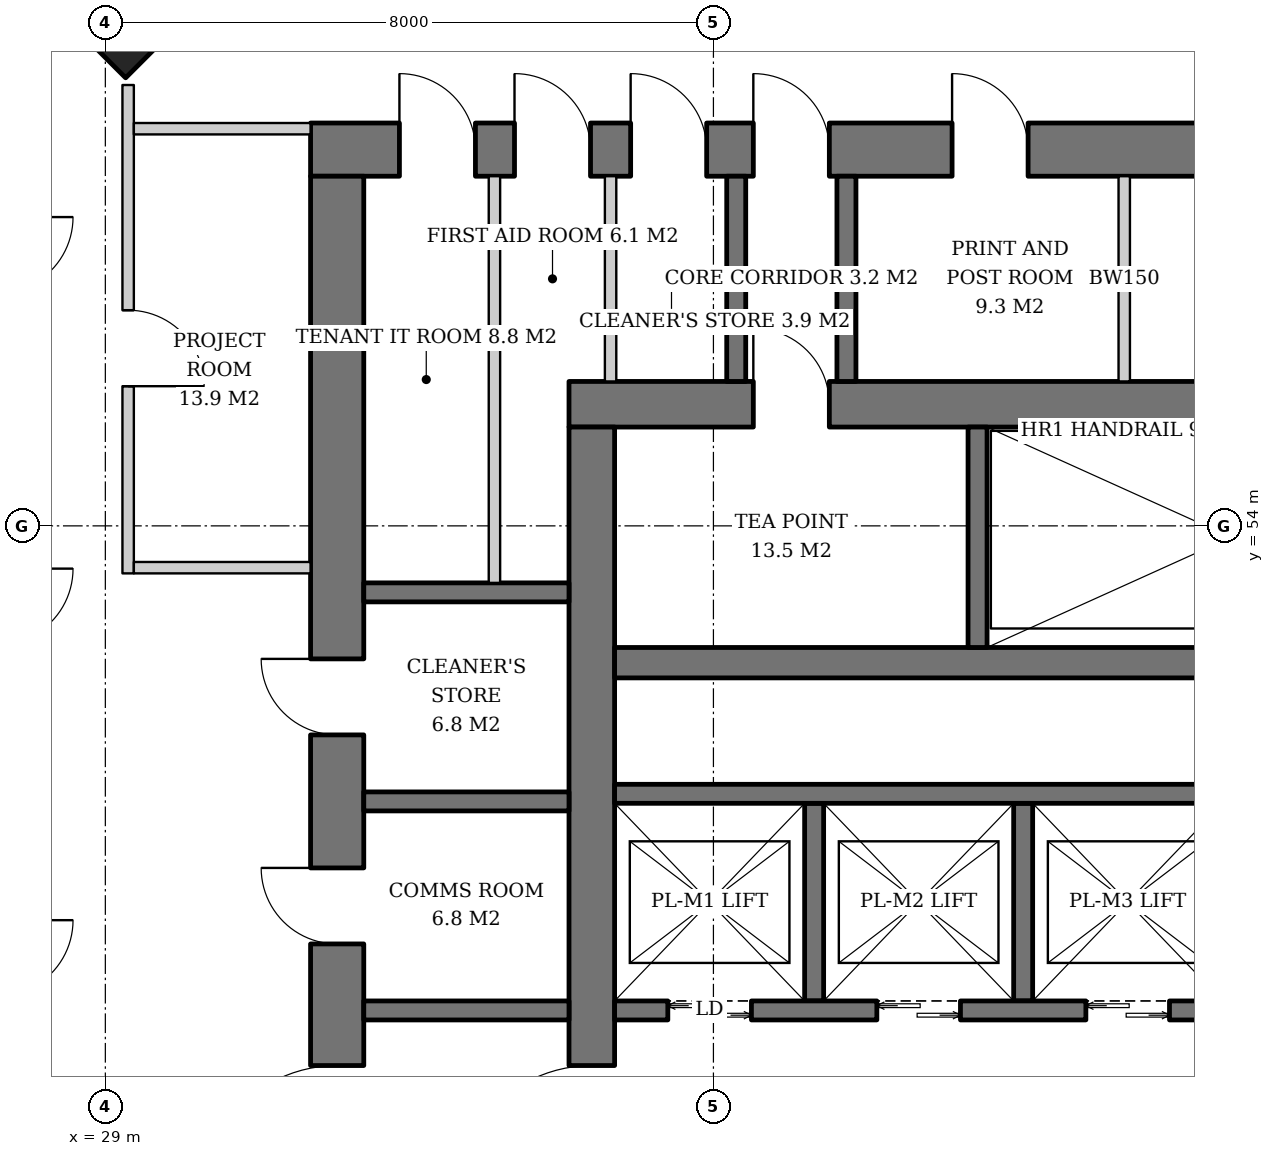
"""IFC4 building model, lengths in metres.
Left out: names, types, materials, properties, quantities, classifications, styles, units other than length and angle.
Written with IfcOpenShell. Run it as: python <this file> out.ifc"""

import sys

from ifc_helpers import new_model, si_unit, direction, frame, frame_2d, origin, origin_2d, place, context, subcontext, project, spatial, rectangle, extrude, element, fill, save


model = new_model("IFC4")
c1 = context("Model", 3, precision=1e-05, world=origin(), true_north=direction((0.0, 1.0)))
c2 = subcontext(c1, "Body", "Model", "MODEL_VIEW")
j1 = project(units=[si_unit("LENGTHUNIT", "METRE"), si_unit("PLANEANGLEUNIT", "RADIAN")], contexts=[c1])
p1 = place(None, origin())
s1 = spatial("IfcSite", under=j1, at=p1, CompositionType="ELEMENT")
p2 = place(p1, origin())
s2 = spatial("IfcBuilding", under=s1, at=p2, CompositionType="ELEMENT")
p3 = place(p2, frame((0.0, 0.0, 150.2)))
s3 = spatial("IfcBuildingStorey", under=s2, at=p3, CompositionType="ELEMENT", Elevation=150.2)
p4 = place(p3, frame((29.229, 61.771, 0.0), z_axis=(0.031962158256, -0.031962158256, 0.998977898093), x_axis=(0.707106781187, 0.707106781187, 0.0)))
e1 = element("IfcColumn", 1, at=p4, inside=s3, PredefinedType="COLUMN", context=c2, shape_type="SweptSolid", body=[
    extrude(rectangle(XDim=2.6, YDim=2.6, at=origin_2d()), origin(), (0.0, 0.0, 1.0), 3.804),
])
p5 = place(p3, frame((35.1, 55.6, 0.0), z_axis=(0.0, 0.0, 1.0), x_axis=(1.0, 0.0, 0.0)))
e2 = element("IfcWall", 2, at=p5, inside=s3, PredefinedType="SHEAR", context=c2, shape_type="SweptSolid", body=[
    extrude(rectangle(XDim=19.8, YDim=0.6, at=frame_2d((9.9, 0.0))), origin(), (0.0, 0.0, 1.0), 3.8),
])
p6 = place(p5, frame((14.54, 0.0, 0.0)))
e3 = element("IfcOpeningElement", 3, at=p6, cuts=e2, PredefinedType="OPENING", context=c2, shape_type="SweptSolid", body=[
    extrude(rectangle(XDim=1.0, YDim=2.1, at=frame_2d((0.5, 1.05))), frame((0.0, 0.31, 0.0), z_axis=(0.0, -1.0, 0.0), x_axis=(1.0, 0.0, 0.0)), (0.0, 0.0, 1.0), 0.62),
])
p7 = place(p5, frame((2.425, 0.0, 0.0)))
e4 = element("IfcOpeningElement", 4, at=p7, cuts=e2, PredefinedType="OPENING", context=c2, shape_type="SweptSolid", body=[
    extrude(rectangle(XDim=1.0, YDim=2.1, at=frame_2d((0.5, 1.05))), frame((0.0, 0.31, 0.0), z_axis=(0.0, -1.0, 0.0), x_axis=(1.0, 0.0, 0.0)), (0.0, 0.0, 1.0), 0.62),
])
p8 = place(p3, frame((35.4, 36.7, 0.0), z_axis=(0.0, 0.0, 1.0), x_axis=(0.0, 1.0, 0.0)))
e5 = element("IfcWall", 5, at=p8, inside=s3, PredefinedType="SHEAR", context=c2, shape_type="SweptSolid", body=[
    extrude(rectangle(XDim=18.6, YDim=0.6, at=frame_2d((9.3, 0.0))), origin(), (0.0, 0.0, 1.0), 3.8),
])
p9 = place(p8, frame((8.4, 0.0, 0.0)))
e6 = element("IfcOpeningElement", 6, at=p9, cuts=e5, PredefinedType="OPENING", context=c2, shape_type="SweptSolid", body=[
    extrude(rectangle(XDim=1.8, YDim=2.4, at=frame_2d((0.9, 1.2))), frame((0.0, 0.31, 0.0), z_axis=(0.0, -1.0, 0.0), x_axis=(1.0, 0.0, 0.0)), (0.0, 0.0, 1.0), 0.62),
])
p10 = place(p3, frame((31.7, 58.95, 0.0), z_axis=(0.0, 0.0, 1.0), x_axis=(1.0, 0.0, 0.0)))
e7 = element("IfcWall", 7, at=p10, inside=s3, PredefinedType="SHEAR", context=c2, shape_type="SweptSolid", body=[
    extrude(rectangle(XDim=26.6, YDim=0.7, at=frame_2d((13.3, 0.0))), origin(), (0.0, 0.0, 1.0), 3.8),
])
p11 = place(p10, frame((17.94, 0.0, 0.0)))
e8 = element("IfcOpeningElement", 8, at=p11, cuts=e7, PredefinedType="OPENING", context=c2, shape_type="SweptSolid", body=[
    extrude(rectangle(XDim=1.0, YDim=2.1, at=frame_2d((0.5, 1.05))), frame((0.0, 0.36, 0.0), z_axis=(0.0, -1.0, 0.0), x_axis=(1.0, 0.0, 0.0)), (0.0, 0.0, 1.0), 0.72),
])
p12 = place(p10, frame((5.825, 0.0, 0.0)))
e9 = element("IfcOpeningElement", 9, at=p12, cuts=e7, PredefinedType="OPENING", context=c2, shape_type="SweptSolid", body=[
    extrude(rectangle(XDim=1.0, YDim=2.1, at=frame_2d((0.5, 1.05))), frame((0.0, 0.36, 0.0), z_axis=(0.0, -1.0, 0.0), x_axis=(1.0, 0.0, 0.0)), (0.0, 0.0, 1.0), 0.72),
])
p13 = place(p10, frame((1.169, 0.0, 0.0)))
e10 = element("IfcOpeningElement", 10, at=p13, cuts=e7, PredefinedType="OPENING", context=c2, shape_type="SweptSolid", body=[
    extrude(rectangle(XDim=1.0, YDim=2.1, at=frame_2d((0.5, 1.05))), frame((0.0, 0.36, 0.0), z_axis=(0.0, -1.0, 0.0), x_axis=(1.0, 0.0, 0.0)), (0.0, 0.0, 1.0), 0.72),
])
p14 = place(p10, frame((2.683, 0.0, 0.0)))
e11 = element("IfcOpeningElement", 11, at=p14, cuts=e7, PredefinedType="OPENING", context=c2, shape_type="SweptSolid", body=[
    extrude(rectangle(XDim=1.0, YDim=2.1, at=frame_2d((0.5, 1.05))), frame((0.0, 0.36, 0.0), z_axis=(0.0, -1.0, 0.0), x_axis=(1.0, 0.0, 0.0)), (0.0, 0.0, 1.0), 0.72),
])
p15 = place(p10, frame((4.211, 0.0, 0.0)))
e12 = element("IfcOpeningElement", 12, at=p15, cuts=e7, PredefinedType="OPENING", context=c2, shape_type="SweptSolid", body=[
    extrude(rectangle(XDim=1.0, YDim=2.1, at=frame_2d((0.5, 1.05))), frame((0.0, 0.36, 0.0), z_axis=(0.0, -1.0, 0.0), x_axis=(1.0, 0.0, 0.0)), (0.0, 0.0, 1.0), 0.72),
])
p16 = place(p10, frame((8.44, 0.0, 0.0)))
e13 = element("IfcOpeningElement", 13, at=p16, cuts=e7, PredefinedType="OPENING", context=c2, shape_type="SweptSolid", body=[
    extrude(rectangle(XDim=1.0, YDim=2.1, at=frame_2d((0.5, 1.05))), frame((0.0, 0.36, 0.0), z_axis=(0.0, -1.0, 0.0), x_axis=(1.0, 0.0, 0.0)), (0.0, 0.0, 1.0), 0.72),
])
p17 = place(p10, frame((13.342, 0.0, 0.0)))
e14 = element("IfcOpeningElement", 14, at=p17, cuts=e7, PredefinedType="OPENING", context=c2, shape_type="SweptSolid", body=[
    extrude(rectangle(XDim=1.0, YDim=2.1, at=frame_2d((0.5, 1.05))), frame((0.0, 0.36, 0.0), z_axis=(0.0, -1.0, 0.0), x_axis=(1.0, 0.0, 0.0)), (0.0, 0.0, 1.0), 0.72),
])
p18 = place(p10, frame((22.4, 0.0, 0.0)))
e15 = element("IfcOpeningElement", 15, at=p18, cuts=e7, PredefinedType="OPENING", context=c2, shape_type="SweptSolid", body=[
    extrude(rectangle(XDim=1.0, YDim=2.1, at=frame_2d((0.5, 1.05))), frame((0.0, 0.36, 0.0), z_axis=(0.0, -1.0, 0.0), x_axis=(1.0, 0.0, 0.0)), (0.0, 0.0, 1.0), 0.72),
])
p19 = place(p3, frame((32.05, 33.4, 0.0), z_axis=(0.0, 0.0, 1.0), x_axis=(0.0, 1.0, 0.0)))
e16 = element("IfcWall", 16, at=p19, inside=s3, PredefinedType="SHEAR", context=c2, shape_type="SweptSolid", body=[
    extrude(rectangle(XDim=25.2, YDim=0.7, at=frame_2d((12.6, 0.0))), origin(), (0.0, 0.0, 1.0), 3.8),
])
p20 = place(p19, frame((11.7, 0.0, 0.0)))
e17 = element("IfcOpeningElement", 17, at=p20, cuts=e16, PredefinedType="OPENING", context=c2, shape_type="SweptSolid", body=[
    extrude(rectangle(XDim=1.8, YDim=2.4, at=frame_2d((0.9, 1.2))), frame((0.0, 0.36, 0.0), z_axis=(0.0, -1.0, 0.0), x_axis=(1.0, 0.0, 0.0)), (0.0, 0.0, 1.0), 0.72),
])
p21 = place(p19, frame((3.6, 0.0, 0.0)))
e18 = element("IfcOpeningElement", 18, at=p21, cuts=e16, PredefinedType="OPENING", context=c2, shape_type="SweptSolid", body=[
    extrude(rectangle(XDim=1.0, YDim=2.1, at=frame_2d((0.5, 1.05))), frame((0.0, 0.36, 0.0), z_axis=(0.0, -1.0, 0.0), x_axis=(1.0, 0.0, 0.0)), (0.0, 0.0, 1.0), 0.72),
])
p22 = place(p19, frame((6.35, 0.0, 0.0)))
e19 = element("IfcOpeningElement", 19, at=p22, cuts=e16, PredefinedType="OPENING", context=c2, shape_type="SweptSolid", body=[
    extrude(rectangle(XDim=1.0, YDim=2.1, at=frame_2d((0.5, 1.05))), frame((0.0, 0.36, 0.0), z_axis=(0.0, -1.0, 0.0), x_axis=(1.0, 0.0, 0.0)), (0.0, 0.0, 1.0), 0.72),
])
p23 = place(p19, frame((9.1, 0.0, 0.0)))
e20 = element("IfcOpeningElement", 20, at=p23, cuts=e16, PredefinedType="OPENING", context=c2, shape_type="SweptSolid", body=[
    extrude(rectangle(XDim=1.0, YDim=2.1, at=frame_2d((0.5, 1.05))), frame((0.0, 0.36, 0.0), z_axis=(0.0, -1.0, 0.0), x_axis=(1.0, 0.0, 0.0)), (0.0, 0.0, 1.0), 0.72),
])
p24 = place(p19, frame((15.1, 0.0, 0.0)))
e21 = element("IfcOpeningElement", 21, at=p24, cuts=e16, PredefinedType="OPENING", context=c2, shape_type="SweptSolid", body=[
    extrude(rectangle(XDim=1.0, YDim=2.1, at=frame_2d((0.5, 1.05))), frame((0.0, 0.36, 0.0), z_axis=(0.0, -1.0, 0.0), x_axis=(1.0, 0.0, 0.0)), (0.0, 0.0, 1.0), 0.72),
])
p25 = place(p19, frame((17.85, 0.0, 0.0)))
e22 = element("IfcOpeningElement", 22, at=p25, cuts=e16, PredefinedType="OPENING", context=c2, shape_type="SweptSolid", body=[
    extrude(rectangle(XDim=1.0, YDim=2.1, at=frame_2d((0.5, 1.05))), frame((0.0, 0.36, 0.0), z_axis=(0.0, -1.0, 0.0), x_axis=(1.0, 0.0, 0.0)), (0.0, 0.0, 1.0), 0.72),
])
p26 = place(p3, frame((35.7, 52.2, 0.0), z_axis=(0.0, 0.0, 1.0), x_axis=(1.0, 0.0, 0.0)))
e23 = element("IfcWall", 23, at=p26, inside=s3, PredefinedType="SHEAR", context=c2, shape_type="SweptSolid", body=[
    extrude(rectangle(XDim=18.6, YDim=0.4, at=frame_2d((9.3, 0.0))), origin(), (0.0, 0.0, 1.0), 3.8),
])
p27 = place(p3, frame((40.475, 52.4, 0.0), z_axis=(0.0, 0.0, 1.0), x_axis=(0.0, 1.0, 0.0)))
e24 = element("IfcWall", 24, at=p27, inside=s3, PredefinedType="SHEAR", context=c2, shape_type="SweptSolid", body=[
    extrude(rectangle(XDim=2.9, YDim=0.25, at=frame_2d((1.45, 0.0))), origin(), (0.0, 0.0, 1.0), 3.8),
])
for number, where, z_axis, x_axis in (
    (25, (38.325, 47.75, 0.0), (0.0, 0.0, 1.0), (0.0, 1.0, 0.0)),
    (26, (41.075, 47.75, 0.0), (0.0, 0.0, 1.0), (0.0, 1.0, 0.0)),
):
    element("IfcWall", number, at=place(p3, frame(where, z_axis=z_axis, x_axis=x_axis)), inside=s3, PredefinedType="SHEAR", context=c2, shape_type="SweptSolid", body=[
        extrude(rectangle(XDim=2.6, YDim=0.25, at=frame_2d((1.3, 0.0))), origin(), (0.0, 0.0, 1.0), 3.8),
    ])
p28 = place(p3, frame((35.7, 50.475, 0.0), z_axis=(0.0, 0.0, 1.0), x_axis=(1.0, 0.0, 0.0)))
e27 = element("IfcWall", 27, at=p28, inside=s3, PredefinedType="SHEAR", context=c2, shape_type="SweptSolid", body=[
    extrude(rectangle(XDim=11.0, YDim=0.25, at=frame_2d((5.5, 0.0))), origin(), (0.0, 0.0, 1.0), 3.8),
])
p29 = place(p3, frame((35.7, 47.625, 0.0), z_axis=(0.0, 0.0, 1.0), x_axis=(1.0, 0.0, 0.0)))
e28 = element("IfcWall", 28, at=p29, inside=s3, PredefinedType="SHEAR", context=c2, shape_type="SweptSolid", body=[
    extrude(rectangle(XDim=12.83, YDim=0.25, at=frame_2d((6.415, 0.0))), origin(), (0.0, 0.0, 1.0), 3.8),
])
p30 = place(p29, frame((0.7, 0.0, 0.0)))
e29 = element("IfcOpeningElement", 29, at=p30, cuts=e28, PredefinedType="OPENING", context=c2, shape_type="SweptSolid", body=[
    extrude(rectangle(XDim=1.1, YDim=2.2, at=frame_2d((0.55, 1.1))), frame((0.0, 0.135, 0.0), z_axis=(0.0, -1.0, 0.0), x_axis=(1.0, 0.0, 0.0)), (0.0, 0.0, 1.0), 0.27),
])
p31 = place(p29, frame((3.45, 0.0, 0.0)))
e30 = element("IfcOpeningElement", 30, at=p31, cuts=e28, PredefinedType="OPENING", context=c2, shape_type="SweptSolid", body=[
    extrude(rectangle(XDim=1.1, YDim=2.2, at=frame_2d((0.55, 1.1))), frame((0.0, 0.135, 0.0), z_axis=(0.0, -1.0, 0.0), x_axis=(1.0, 0.0, 0.0)), (0.0, 0.0, 1.0), 0.27),
])
p32 = place(p29, frame((6.2, 0.0, 0.0)))
e31 = element("IfcOpeningElement", 31, at=p32, cuts=e28, PredefinedType="OPENING", context=c2, shape_type="SweptSolid", body=[
    extrude(rectangle(XDim=1.1, YDim=2.2, at=frame_2d((0.55, 1.1))), frame((0.0, 0.135, 0.0), z_axis=(0.0, -1.0, 0.0), x_axis=(1.0, 0.0, 0.0)), (0.0, 0.0, 1.0), 0.27),
])
p33 = place(p29, frame((8.95, 0.0, 0.0)))
e32 = element("IfcOpeningElement", 32, at=p33, cuts=e28, PredefinedType="OPENING", context=c2, shape_type="SweptSolid", body=[
    extrude(rectangle(XDim=1.1, YDim=2.2, at=frame_2d((0.55, 1.1))), frame((0.0, 0.135, 0.0), z_axis=(0.0, -1.0, 0.0), x_axis=(1.0, 0.0, 0.0)), (0.0, 0.0, 1.0), 0.27),
])
p34 = place(p29, frame((11.515, 0.0, 0.0)))
e33 = element("IfcOpeningElement", 33, at=p34, cuts=e28, PredefinedType="OPENING", context=c2, shape_type="SweptSolid", body=[
    extrude(rectangle(XDim=0.8, YDim=2.0, at=frame_2d((0.4, 1.0))), frame((0.0, 0.135, 0.0), z_axis=(0.0, -1.0, 0.0), x_axis=(1.0, 0.0, 0.0)), (0.0, 0.0, 1.0), 0.27),
])
for number, where, z_axis, x_axis in (
    (34, (32.4, 47.625, 0.0), (0.0, 0.0, 1.0), (1.0, 0.0, 0.0)),
    (35, (32.4, 50.375, 0.0), (0.0, 0.0, 1.0), (1.0, 0.0, 0.0)),
    (36, (32.4, 53.125, 0.0), (0.0, 0.0, 1.0), (1.0, 0.0, 0.0)),
):
    element("IfcWall", number, at=place(p3, frame(where, z_axis=z_axis, x_axis=x_axis)), inside=s3, PredefinedType="SHEAR", context=c2, shape_type="SweptSolid", body=[
        extrude(rectangle(XDim=2.7, YDim=0.25, at=frame_2d((1.35, 0.0))), origin(), (0.0, 0.0, 1.0), 3.8),
    ])
for number, where, z_axis, x_axis in (
    (37, (37.3, 55.9, 0.0), (0.0, 0.0, 1.0), (0.0, 1.0, 0.0)),
    (38, (38.75, 55.9, 0.0), (0.0, 0.0, 1.0), (0.0, 1.0, 0.0)),
):
    element("IfcWall", number, at=place(p3, frame(where, z_axis=z_axis, x_axis=x_axis)), inside=s3, PredefinedType="SOLIDWALL", context=c2, shape_type="SweptSolid", body=[
        extrude(rectangle(XDim=2.7, YDim=0.25, at=frame_2d((1.35, 0.0))), origin(), (0.0, 0.0, 1.0), 3.62),
    ])
p35 = place(p3, frame((34.119, 53.25, 0.0), z_axis=(0.0, 0.0, 1.0), x_axis=(0.0, 1.0, 0.0)))
e39 = element("IfcWall", 39, at=p35, inside=s3, PredefinedType="SOLIDWALL", context=c2, shape_type="SweptSolid", body=[
    extrude(rectangle(XDim=5.35, YDim=0.15, at=frame_2d((2.675, 0.0))), origin(), (0.0, 0.0, 1.0), 3.62),
])
for number, where, z_axis, x_axis in (
    (40, (35.647, 55.9, 0.0), (0.0, 0.0, 1.0), (0.0, 1.0, 0.0)),
    (41, (42.405, 55.9, 0.0), (0.0, 0.0, 1.0), (0.0, 1.0, 0.0)),
):
    element("IfcWall", number, at=place(p3, frame(where, z_axis=z_axis, x_axis=x_axis)), inside=s3, PredefinedType="SOLIDWALL", context=c2, shape_type="SweptSolid", body=[
        extrude(rectangle(XDim=2.7, YDim=0.15, at=frame_2d((1.35, 0.0))), origin(), (0.0, 0.0, 1.0), 3.62),
    ])
p36 = place(p3, frame((29.3, 59.8, 0.0), z_axis=(0.0, 0.0, 1.0), x_axis=(0.0, -1.0, 0.0)))
e42 = element("IfcWall", 42, at=p36, inside=s3, PredefinedType="PARTITIONING", context=c2, shape_type="SweptSolid", body=[
    extrude(rectangle(XDim=6.425, YDim=0.15, at=frame_2d((3.212, 0.0))), origin(), (0.0, 0.0, 1.0), 2.72),
])
p37 = place(p36, frame((2.962, 0.0, 0.0)))
e43 = element("IfcOpeningElement", 43, at=p37, cuts=e42, PredefinedType="OPENING", context=c2, shape_type="SweptSolid", body=[
    extrude(rectangle(XDim=1.0, YDim=2.1, at=frame_2d((0.5, 1.05))), frame((0.0, 0.085, 0.0), z_axis=(0.0, -1.0, 0.0), x_axis=(1.0, 0.0, 0.0)), (0.0, 0.0, 1.0), 0.17),
])
for number, where, z_axis, x_axis in (
    (44, (31.7, 59.225, 0.0), (0.0, 0.0, 1.0), (-1.0, 0.0, 0.0)),
    (45, (31.7, 53.45, 0.0), (0.0, 0.0, 1.0), (-1.0, 0.0, 0.0)),
):
    element("IfcWall", number, at=place(p3, frame(where, z_axis=z_axis, x_axis=x_axis)), inside=s3, PredefinedType="PARTITIONING", context=c2, shape_type="SweptSolid", body=[
        extrude(rectangle(XDim=2.325, YDim=0.15, at=frame_2d((1.163, 0.0))), origin(), (0.0, 0.0, 1.0), 3.62),
    ])
p38 = place(p30, origin())
e46 = element("IfcDoor", 46, at=p38, inside=s3, OperationType="DOUBLE_DOOR_SLIDING", PredefinedType="DOOR", context=c2, shape_type="SweptSolid", body=[
    extrude(rectangle(XDim=1.1, YDim=2.2, at=frame_2d((0.55, 1.1))), frame((0.0, 0.025, 0.0), z_axis=(0.0, -1.0, 0.0), x_axis=(1.0, 0.0, 0.0)), (0.0, 0.0, 1.0), 0.05),
])
fill(e29, e46)
p39 = place(p31, origin())
e47 = element("IfcDoor", 47, at=p39, inside=s3, OperationType="DOUBLE_DOOR_SLIDING", PredefinedType="DOOR", context=c2, shape_type="SweptSolid", body=[
    extrude(rectangle(XDim=1.1, YDim=2.2, at=frame_2d((0.55, 1.1))), frame((0.0, 0.025, 0.0), z_axis=(0.0, -1.0, 0.0), x_axis=(1.0, 0.0, 0.0)), (0.0, 0.0, 1.0), 0.05),
])
fill(e30, e47)
p40 = place(p32, origin())
e48 = element("IfcDoor", 48, at=p40, inside=s3, OperationType="DOUBLE_DOOR_SLIDING", PredefinedType="DOOR", context=c2, shape_type="SweptSolid", body=[
    extrude(rectangle(XDim=1.1, YDim=2.2, at=frame_2d((0.55, 1.1))), frame((0.0, 0.025, 0.0), z_axis=(0.0, -1.0, 0.0), x_axis=(1.0, 0.0, 0.0)), (0.0, 0.0, 1.0), 0.05),
])
fill(e31, e48)
p41 = place(p9, origin())
e49 = element("IfcDoor", 49, at=p41, inside=s3, OperationType="DOUBLE_DOOR_SINGLE_SWING", PredefinedType="DOOR", context=c2, shape_type="SweptSolid", body=[
    extrude(rectangle(XDim=1.8, YDim=2.4, at=frame_2d((0.9, 1.2))), frame((0.0, 0.025, 0.0), z_axis=(0.0, -1.0, 0.0), x_axis=(1.0, 0.0, 0.0)), (0.0, 0.0, 1.0), 0.05),
])
fill(e6, e49)
p42 = place(p20, origin())
e50 = element("IfcDoor", 50, at=p42, inside=s3, OperationType="DOUBLE_DOOR_SINGLE_SWING", PredefinedType="DOOR", context=c2, shape_type="SweptSolid", body=[
    extrude(rectangle(XDim=1.8, YDim=2.4, at=frame_2d((0.9, 1.2))), frame((0.0, 0.025, 0.0), z_axis=(0.0, -1.0, 0.0), x_axis=(1.0, 0.0, 0.0)), (0.0, 0.0, 1.0), 0.05),
])
fill(e17, e50)
p43 = place(p12, origin())
e51 = element("IfcDoor", 51, at=p43, inside=s3, OperationType="SINGLE_SWING_LEFT", PredefinedType="DOOR", context=c2, shape_type="SweptSolid", body=[
    extrude(rectangle(XDim=1.0, YDim=2.1, at=frame_2d((0.5, 1.05))), frame((0.0, 0.025, 0.0), z_axis=(0.0, -1.0, 0.0), x_axis=(1.0, 0.0, 0.0)), (0.0, 0.0, 1.0), 0.05),
])
fill(e9, e51)
p44 = place(p7, origin())
e52 = element("IfcDoor", 52, at=p44, inside=s3, OperationType="SINGLE_SWING_LEFT", PredefinedType="DOOR", context=c2, shape_type="SweptSolid", body=[
    extrude(rectangle(XDim=1.0, YDim=2.1, at=frame_2d((0.5, 1.05))), frame((0.0, -0.24, 0.0), z_axis=(0.0, -1.0, 0.0), x_axis=(1.0, 0.0, 0.0)), (0.0, 0.0, 1.0), 0.05),
])
fill(e4, e52)
p45 = place(p24, origin())
e53 = element("IfcDoor", 53, at=p45, inside=s3, OperationType="SINGLE_SWING_RIGHT", PredefinedType="DOOR", context=c2, shape_type="SweptSolid", body=[
    extrude(rectangle(XDim=1.0, YDim=2.1, at=frame_2d((0.5, 1.05))), frame((0.0, -0.29, 0.0), z_axis=(0.0, -1.0, 0.0), x_axis=(1.0, 0.0, 0.0)), (0.0, 0.0, 1.0), 0.05),
])
fill(e21, e53)
p46 = place(p25, origin())
e54 = element("IfcDoor", 54, at=p46, inside=s3, OperationType="SINGLE_SWING_RIGHT", PredefinedType="DOOR", context=c2, shape_type="SweptSolid", body=[
    extrude(rectangle(XDim=1.0, YDim=2.1, at=frame_2d((0.5, 1.05))), frame((0.0, -0.29, 0.0), z_axis=(0.0, -1.0, 0.0), x_axis=(1.0, 0.0, 0.0)), (0.0, 0.0, 1.0), 0.05),
])
fill(e22, e54)
p47 = place(p13, origin())
e55 = element("IfcDoor", 55, at=p47, inside=s3, OperationType="SINGLE_SWING_LEFT", PredefinedType="DOOR", context=c2, shape_type="SweptSolid", body=[
    extrude(rectangle(XDim=1.0, YDim=2.1, at=frame_2d((0.5, 1.05))), frame((0.0, -0.29, 0.0), z_axis=(0.0, -1.0, 0.0), x_axis=(1.0, 0.0, 0.0)), (0.0, 0.0, 1.0), 0.05),
])
fill(e10, e55)
p48 = place(p14, origin())
e56 = element("IfcDoor", 56, at=p48, inside=s3, OperationType="SINGLE_SWING_LEFT", PredefinedType="DOOR", context=c2, shape_type="SweptSolid", body=[
    extrude(rectangle(XDim=1.0, YDim=2.1, at=frame_2d((0.5, 1.05))), frame((0.0, -0.29, 0.0), z_axis=(0.0, -1.0, 0.0), x_axis=(1.0, 0.0, 0.0)), (0.0, 0.0, 1.0), 0.05),
])
fill(e11, e56)
p49 = place(p15, origin())
e57 = element("IfcDoor", 57, at=p49, inside=s3, OperationType="SINGLE_SWING_LEFT", PredefinedType="DOOR", context=c2, shape_type="SweptSolid", body=[
    extrude(rectangle(XDim=1.0, YDim=2.1, at=frame_2d((0.5, 1.05))), frame((0.0, -0.29, 0.0), z_axis=(0.0, -1.0, 0.0), x_axis=(1.0, 0.0, 0.0)), (0.0, 0.0, 1.0), 0.05),
])
fill(e12, e57)
p50 = place(p16, origin())
e58 = element("IfcDoor", 58, at=p50, inside=s3, OperationType="SINGLE_SWING_LEFT", PredefinedType="DOOR", context=c2, shape_type="SweptSolid", body=[
    extrude(rectangle(XDim=1.0, YDim=2.1, at=frame_2d((0.5, 1.05))), frame((0.0, -0.29, 0.0), z_axis=(0.0, -1.0, 0.0), x_axis=(1.0, 0.0, 0.0)), (0.0, 0.0, 1.0), 0.05),
])
fill(e13, e58)
p51 = place(p37, origin())
e59 = element("IfcDoor", 59, at=p51, inside=s3, OperationType="SINGLE_SWING_RIGHT", PredefinedType="DOOR", context=c2, shape_type="SweptSolid", body=[
    extrude(rectangle(XDim=1.0, YDim=2.1, at=frame_2d((0.5, 1.05))), frame((0.0, 0.025, 0.0), z_axis=(0.0, -1.0, 0.0), x_axis=(1.0, 0.0, 0.0)), (0.0, 0.0, 1.0), 0.05),
])
fill(e43, e59)
save(model, sys.argv[1])
